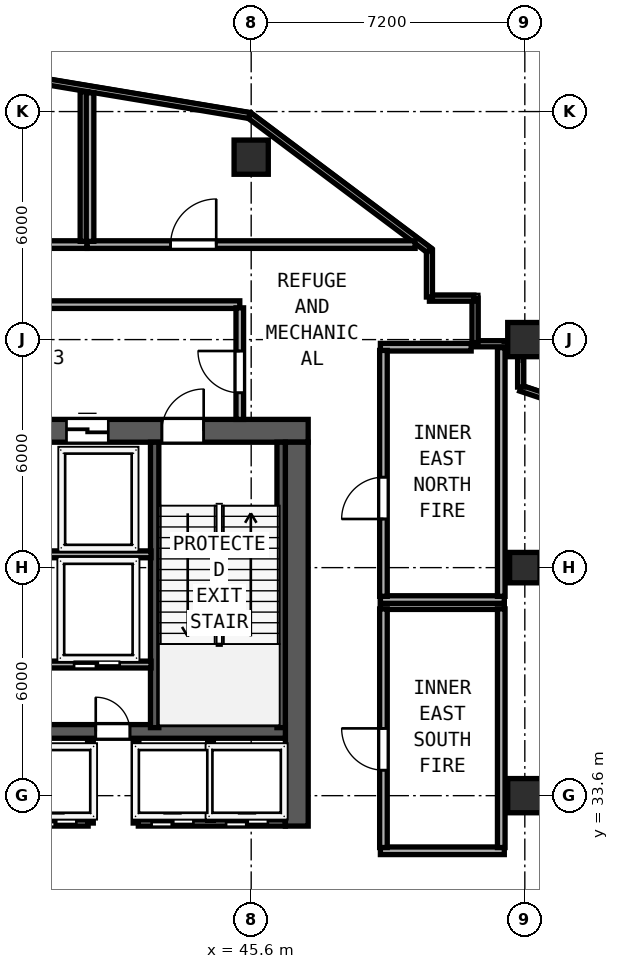
"""IFC4 building model, lengths in metres.
Left out: names, types, materials, properties, quantities, classifications, styles, units other than length and angle.
Written with IfcOpenShell. Run it as: python <this file> out.ifc"""

import sys

from ifc_helpers import new_model, si_unit, direction, frame, frame_2d, origin, origin_2d, place, context, subcontext, project, spatial, rectangle, hollow_rectangle, extrude, element, fill, save


model = new_model("IFC4")
c1 = context("Model", 3, precision=1e-05, world=origin(), true_north=direction((0.0, 1.0)))
c2 = subcontext(c1, "Body", "Model", "MODEL_VIEW")
j1 = project(units=[si_unit("LENGTHUNIT", "METRE"), si_unit("PLANEANGLEUNIT", "RADIAN")], contexts=[c1])
p1 = place(None, origin())
s1 = spatial("IfcSite", under=j1, at=p1, CompositionType="ELEMENT")
p2 = place(p1, origin())
s2 = spatial("IfcBuilding", under=s1, at=p2, CompositionType="ELEMENT")
p3 = place(p2, frame((0.0, 0.0, 207.0)))
s3 = spatial("IfcBuildingStorey", under=s2, at=p3, CompositionType="ELEMENT", Elevation=207.0)
p4 = place(p3, frame((29.7, 43.2, 0.0), z_axis=(0.0, 0.0, 1.0), x_axis=(1.0, 0.0, 0.0)))
e1 = element("IfcWall", 1, at=p4, inside=s3, PredefinedType="SHEAR", context=c2, shape_type="SweptSolid", body=[
    extrude(rectangle(XDim=17.4, YDim=0.6, at=frame_2d((8.7, 0.0))), origin(), (0.0, 0.0, 1.0), 4.42),
])
p5 = place(p4, frame((2.35, 0.0, 0.0)))
e2 = element("IfcOpeningElement", 2, at=p5, cuts=e1, PredefinedType="OPENING", context=c2, shape_type="SweptSolid", body=[
    extrude(rectangle(XDim=1.1, YDim=2.15, at=frame_2d((0.55, 1.075))), frame((0.0, 0.31, 0.0), z_axis=(0.0, -1.0, 0.0), x_axis=(1.0, 0.0, 0.0)), (0.0, 0.0, 1.0), 0.62),
])
p6 = place(p4, frame((7.46, 0.0, 0.0)))
e3 = element("IfcOpeningElement", 3, at=p6, cuts=e1, PredefinedType="OPENING", context=c2, shape_type="SweptSolid", body=[
    extrude(rectangle(XDim=1.1, YDim=2.15, at=frame_2d((0.55, 1.075))), frame((0.0, 0.31, 0.0), z_axis=(0.0, -1.0, 0.0), x_axis=(1.0, 0.0, 0.0)), (0.0, 0.0, 1.0), 0.62),
])
p7 = place(p4, frame((13.55, 0.0, 0.0)))
e4 = element("IfcOpeningElement", 4, at=p7, cuts=e1, PredefinedType="OPENING", context=c2, shape_type="SweptSolid", body=[
    extrude(rectangle(XDim=1.1, YDim=2.15, at=frame_2d((0.55, 1.075))), frame((0.0, 0.31, 0.0), z_axis=(0.0, -1.0, 0.0), x_axis=(1.0, 0.0, 0.0)), (0.0, 0.0, 1.0), 0.62),
])
p8 = place(p4, frame((4.68, 0.0, 0.0)))
e5 = element("IfcOpeningElement", 5, at=p8, cuts=e1, PredefinedType="OPENING", context=c2, shape_type="SweptSolid", body=[
    extrude(rectangle(XDim=1.1, YDim=2.2, at=frame_2d((0.55, 1.1))), frame((0.0, 0.31, 0.0), z_axis=(0.0, -1.0, 0.0), x_axis=(1.0, 0.0, 0.0)), (0.0, 0.0, 1.0), 0.62),
])
p9 = place(p4, frame((11.04, 0.0, 0.0)))
e6 = element("IfcOpeningElement", 6, at=p9, cuts=e1, PredefinedType="OPENING", context=c2, shape_type="SweptSolid", body=[
    extrude(rectangle(XDim=1.1, YDim=2.2, at=frame_2d((0.55, 1.1))), frame((0.0, 0.31, 0.0), z_axis=(0.0, -1.0, 0.0), x_axis=(1.0, 0.0, 0.0)), (0.0, 0.0, 1.0), 0.62),
])
p10 = place(p3, frame((46.8, 32.8, 0.0), z_axis=(0.0, 0.0, 1.0), x_axis=(0.0, 1.0, 0.0)))
e7 = element("IfcWall", 7, at=p10, inside=s3, PredefinedType="SHEAR", context=c2, shape_type="SweptSolid", body=[
    extrude(rectangle(XDim=10.1, YDim=0.6, at=frame_2d((5.05, 0.0))), origin(), (0.0, 0.0, 1.0), 4.42),
])
p11 = place(p3, frame((30.3, 35.29, 0.0), z_axis=(0.0, 0.0, 1.0), x_axis=(1.0, 0.0, 0.0)))
e8 = element("IfcWall", 8, at=p11, inside=s3, PredefinedType="SHEAR", context=c2, shape_type="SweptSolid", body=[
    extrude(rectangle(XDim=16.2, YDim=0.36, at=frame_2d((8.1, 0.0))), origin(), (0.0, 0.0, 1.0), 4.42),
])
p12 = place(p11, frame((5.05, 0.0, 0.0), z_axis=(0.0, 0.0, 1.0), x_axis=(-1.0, 0.0, 0.0)))
e9 = element("IfcOpeningElement", 9, at=p12, cuts=e8, PredefinedType="OPENING", context=c2, shape_type="SweptSolid", body=[
    extrude(rectangle(XDim=0.9, YDim=2.1, at=frame_2d((0.45, 1.05))), frame((0.0, 0.19, 0.0), z_axis=(0.0, -1.0, 0.0), x_axis=(1.0, 0.0, 0.0)), (0.0, 0.0, 1.0), 0.38),
])
p13 = place(p11, frame((12.11, 0.0, 0.0), z_axis=(0.0, 0.0, 1.0), x_axis=(-1.0, 0.0, 0.0)))
e10 = element("IfcOpeningElement", 10, at=p13, cuts=e8, PredefinedType="OPENING", context=c2, shape_type="SweptSolid", body=[
    extrude(rectangle(XDim=0.9, YDim=2.1, at=frame_2d((0.45, 1.05))), frame((0.0, 0.19, 0.0), z_axis=(0.0, -1.0, 0.0), x_axis=(1.0, 0.0, 0.0)), (0.0, 0.0, 1.0), 0.38),
])
for number, where, z_axis, x_axis in (
    (11, (43.06, 35.39, 0.0), (0.0, 0.0, 1.0), (0.0, 1.0, 0.0)),
    (12, (46.388, 35.39, 0.0), (0.0, 0.0, 1.0), (0.0, 1.0, 0.0)),
):
    element("IfcWall", number, at=place(p3, frame(where, z_axis=z_axis, x_axis=x_axis)), inside=s3, PredefinedType="SHEAR", context=c2, shape_type="SweptSolid", body=[
        extrude(rectangle(XDim=7.51, YDim=0.22, at=frame_2d((3.755, 0.0))), origin(), (0.0, 0.0, 1.0), 4.42),
    ])
for number, where, z_axis, x_axis in (
    (13, (52.8, 33.6, 0.0), (0.0, 0.0, 1.0), (1.0, 0.0, 0.0)),
    (14, (52.8, 45.6, 0.0), (0.0, 0.0, 1.0), (1.0, 0.0, 0.0)),
    (15, (45.6, 50.4, 0.0), (0.0, 0.0, 1.0), (1.0, 0.0, 0.0)),
):
    element("IfcColumn", number, at=place(p3, frame(where, z_axis=z_axis, x_axis=x_axis)), inside=s3, PredefinedType="COLUMN", context=c2, shape_type="SweptSolid", body=[
        extrude(hollow_rectangle(XDim=0.9, YDim=0.9, WallThickness=0.034, at=origin_2d()), origin(), (0.0, 0.0, 1.0), 4.6),
    ])
p14 = place(p3, frame((52.8, 39.6, 0.0), z_axis=(0.0, 0.0, 1.0), x_axis=(1.0, 0.0, 0.0)))
e16 = element("IfcColumn", 16, at=p14, inside=s3, PredefinedType="COLUMN", context=c2, shape_type="SweptSolid", body=[
    extrude(hollow_rectangle(XDim=0.8, YDim=0.8, WallThickness=0.03, at=origin_2d()), origin(), (0.0, 0.0, 1.0), 4.6),
])
p15 = place(p3, frame((58.476, 42.392, 0.0), z_axis=(0.0, 0.0, 1.0), x_axis=(-0.948687300706, 0.316215757798, 0.0)))
e17 = element("IfcWall", 17, at=p15, inside=s3, PredefinedType="PARAPET", context=c2, shape_type="SweptSolid", body=[
    extrude(rectangle(XDim=6.099, YDim=0.16, at=frame_2d((3.05, 0.0))), origin(), (0.0, 0.0, 1.0), 1.15),
])
p16 = place(p3, frame((52.69, 44.351, 0.0), z_axis=(0.0, 0.0, 1.0), x_axis=(0.0, 1.0, 0.0)))
e18 = element("IfcWall", 18, at=p16, inside=s3, PredefinedType="PARAPET", context=c2, shape_type="SweptSolid", body=[
    extrude(rectangle(XDim=0.807, YDim=0.16, at=frame_2d((0.404, 0.0))), origin(), (0.0, 0.0, 1.0), 1.15),
])
p17 = place(p3, frame((52.358, 45.49, 0.0), z_axis=(0.0, 0.0, 1.0), x_axis=(-1.0, 0.0, 0.0)))
e19 = element("IfcWall", 19, at=p17, inside=s3, PredefinedType="PARAPET", context=c2, shape_type="SweptSolid", body=[
    extrude(rectangle(XDim=0.868, YDim=0.16, at=frame_2d((0.434, 0.0))), origin(), (0.0, 0.0, 1.0), 1.15),
])
for number, where, z_axis, x_axis in (
    (20, (51.49, 45.52, 0.0), (0.0, 0.0, 1.0), (0.0, 1.0, 0.0)),
    (21, (51.46, 46.69, 0.0), (0.0, 0.0, 1.0), (-1.0, 0.0, 0.0)),
):
    element("IfcWall", number, at=place(p3, frame(where, z_axis=z_axis, x_axis=x_axis)), inside=s3, PredefinedType="PARAPET", context=c2, shape_type="SweptSolid", body=[
        extrude(rectangle(XDim=1.17, YDim=0.16, at=frame_2d((0.585, 0.0))), origin(), (0.0, 0.0, 1.0), 1.15),
    ])
p18 = place(p3, frame((50.29, 46.72, 0.0), z_axis=(0.0, 0.0, 1.0), x_axis=(0.0, 1.0, 0.0)))
e22 = element("IfcWall", 22, at=p18, inside=s3, PredefinedType="PARAPET", context=c2, shape_type="SweptSolid", body=[
    extrude(rectangle(XDim=1.225, YDim=0.16, at=frame_2d((0.613, 0.0))), origin(), (0.0, 0.0, 1.0), 1.15),
])
p19 = place(p3, frame((50.278, 47.954, 0.0), z_axis=(0.0, 0.0, 1.0), x_axis=(-0.800019851171, 0.599973530859, 0.0)))
e23 = element("IfcWall", 23, at=p19, inside=s3, PredefinedType="PARAPET", context=c2, shape_type="SweptSolid", body=[
    extrude(rectangle(XDim=5.903, YDim=0.16, at=frame_2d((2.952, 0.0))), origin(), (0.0, 0.0, 1.0), 1.15),
])
p20 = place(p3, frame((45.555, 51.496, 0.0), z_axis=(0.0, 0.0, 1.0), x_axis=(-0.986393014224, 0.164404444863, 0.0)))
e24 = element("IfcWall", 24, at=p20, inside=s3, PredefinedType="PARAPET", context=c2, shape_type="SweptSolid", body=[
    extrude(rectangle(XDim=7.254, YDim=0.16, at=frame_2d((3.627, 0.0))), origin(), (0.0, 0.0, 1.0), 1.15),
])
p21 = place(p3, frame((31.5, 46.52, 0.0), z_axis=(0.0, 0.0, 1.0), x_axis=(1.0, 0.0, 0.0)))
e25 = element("IfcWall", 25, at=p21, inside=s3, PredefinedType="SOLIDWALL", context=c2, shape_type="SweptSolid", body=[
    extrude(rectangle(XDim=13.8, YDim=0.2, at=frame_2d((6.9, 0.0))), origin(), (0.0, 0.0, 1.0), 4.42),
])
p22 = place(p3, frame((45.3, 43.5, 0.0), z_axis=(0.0, 0.0, 1.0), x_axis=(0.0, 1.0, 0.0)))
e26 = element("IfcWall", 26, at=p22, inside=s3, PredefinedType="SOLIDWALL", context=c2, shape_type="SweptSolid", body=[
    extrude(rectangle(XDim=2.935, YDim=0.2, at=frame_2d((1.468, 0.0))), origin(), (0.0, 0.0, 1.0), 4.42),
])
p23 = place(p22, frame((0.7, 0.0, 0.0)))
e27 = element("IfcOpeningElement", 27, at=p23, cuts=e26, PredefinedType="OPENING", context=c2, shape_type="SweptSolid", body=[
    extrude(rectangle(XDim=1.1, YDim=2.15, at=frame_2d((0.55, 1.075))), frame((0.0, 0.11, 0.0), z_axis=(0.0, -1.0, 0.0), x_axis=(1.0, 0.0, 0.0)), (0.0, 0.0, 1.0), 0.22),
])
p24 = place(p3, frame((40.195, 39.95, 0.0), z_axis=(0.0, 0.0, 1.0), x_axis=(1.0, 0.0, 0.0)))
e28 = element("IfcWall", 28, at=p24, inside=s3, PredefinedType="SOLIDWALL", context=c2, shape_type="SweptSolid", body=[
    extrude(rectangle(XDim=2.77, YDim=0.18, at=frame_2d((1.385, 0.0))), origin(), (0.0, 0.0, 1.0), 4.42),
])
p25 = place(p3, frame((40.195, 37.05, 0.0), z_axis=(0.0, 0.0, 1.0), x_axis=(1.0, 0.0, 0.0)))
e29 = element("IfcWall", 29, at=p25, inside=s3, PredefinedType="SOLIDWALL", context=c2, shape_type="SweptSolid", body=[
    extrude(rectangle(XDim=2.77, YDim=0.18, at=frame_2d((1.385, 0.0))), origin(), (0.0, 0.0, 1.0), 4.42),
])
p26 = place(p25, frame((1.945, 0.0, 0.0), z_axis=(0.0, 0.0, 1.0), x_axis=(-1.0, 0.0, 0.0)))
e30 = element("IfcOpeningElement", 30, at=p26, cuts=e29, PredefinedType="OPENING", context=c2, shape_type="SweptSolid", body=[
    extrude(rectangle(XDim=1.2, YDim=2.2, at=frame_2d((0.6, 1.1))), frame((0.0, 0.1, 0.0), z_axis=(0.0, -1.0, 0.0), x_axis=(1.0, 0.0, 0.0)), (0.0, 0.0, 1.0), 0.2),
])
for number, where, z_axis, x_axis in (
    (31, (41.37, 32.88, 0.0), (0.0, 0.0, 1.0), (0.0, 1.0, 0.0)),
    (32, (42.57, 32.88, 0.0), (0.0, 0.0, 1.0), (0.0, 1.0, 0.0)),
):
    element("IfcWall", number, at=place(p3, frame(where, z_axis=z_axis, x_axis=x_axis)), inside=s3, PredefinedType="SOLIDWALL", context=c2, shape_type="SweptSolid", body=[
        extrude(rectangle(XDim=2.17, YDim=0.15, at=frame_2d((1.085, 0.0))), origin(), (0.0, 0.0, 1.0), 4.42),
    ])
p27 = place(p3, frame((35.57, 32.88, 0.0), z_axis=(0.0, 0.0, 1.0), x_axis=(1.0, 0.0, 0.0)))
e33 = element("IfcWall", 33, at=p27, inside=s3, PredefinedType="SOLIDWALL", context=c2, shape_type="SweptSolid", body=[
    extrude(rectangle(XDim=5.74, YDim=0.16, at=frame_2d((2.87, 0.0))), origin(), (0.0, 0.0, 1.0), 4.42),
])
p28 = place(p27, frame((1.49, 0.0, 0.0), z_axis=(0.0, 0.0, 1.0), x_axis=(-1.0, 0.0, 0.0)))
e34 = element("IfcOpeningElement", 34, at=p28, cuts=e33, PredefinedType="OPENING", context=c2, shape_type="SweptSolid", body=[
    extrude(rectangle(XDim=0.95, YDim=2.12, at=frame_2d((0.475, 1.06))), frame((0.0, 0.09, 0.0), z_axis=(0.0, -1.0, 0.0), x_axis=(1.0, 0.0, 0.0)), (0.0, 0.0, 1.0), 0.18),
])
p29 = place(p27, frame((5.43, 0.0, 0.0), z_axis=(0.0, 0.0, 1.0), x_axis=(-1.0, 0.0, 0.0)))
e35 = element("IfcOpeningElement", 35, at=p29, cuts=e33, PredefinedType="OPENING", context=c2, shape_type="SweptSolid", body=[
    extrude(rectangle(XDim=1.1, YDim=2.2, at=frame_2d((0.55, 1.1))), frame((0.0, 0.09, 0.0), z_axis=(0.0, -1.0, 0.0), x_axis=(1.0, 0.0, 0.0)), (0.0, 0.0, 1.0), 0.18),
])
p30 = place(p3, frame((42.63, 32.88, 0.0), z_axis=(0.0, 0.0, 1.0), x_axis=(1.0, 0.0, 0.0)))
e36 = element("IfcWall", 36, at=p30, inside=s3, PredefinedType="SOLIDWALL", context=c2, shape_type="SweptSolid", body=[
    extrude(rectangle(XDim=3.87, YDim=0.16, at=frame_2d((1.935, 0.0))), origin(), (0.0, 0.0, 1.0), 4.42),
])
p31 = place(p30, frame((1.45, 0.0, 0.0), z_axis=(0.0, 0.0, 1.0), x_axis=(-1.0, 0.0, 0.0)))
e37 = element("IfcOpeningElement", 37, at=p31, cuts=e36, PredefinedType="OPENING", context=c2, shape_type="SweptSolid", body=[
    extrude(rectangle(XDim=1.1, YDim=2.2, at=frame_2d((0.55, 1.1))), frame((0.0, 0.09, 0.0), z_axis=(0.0, -1.0, 0.0), x_axis=(1.0, 0.0, 0.0)), (0.0, 0.0, 1.0), 0.18),
])
p32 = place(p30, frame((3.41, 0.0, 0.0), z_axis=(0.0, 0.0, 1.0), x_axis=(-1.0, 0.0, 0.0)))
e38 = element("IfcOpeningElement", 38, at=p32, cuts=e36, PredefinedType="OPENING", context=c2, shape_type="SweptSolid", body=[
    extrude(rectangle(XDim=1.1, YDim=2.2, at=frame_2d((0.55, 1.1))), frame((0.0, 0.09, 0.0), z_axis=(0.0, -1.0, 0.0), x_axis=(1.0, 0.0, 0.0)), (0.0, 0.0, 1.0), 0.18),
])
p33 = place(p3, frame((44.53, 32.95, 0.0), z_axis=(0.0, 0.0, 1.0), x_axis=(0.0, 1.0, 0.0)))
e39 = element("IfcWall", 39, at=p33, inside=s3, PredefinedType="SOLIDWALL", context=c2, shape_type="SweptSolid", body=[
    extrude(rectangle(XDim=2.05, YDim=0.15, at=frame_2d((1.025, 0.0))), origin(), (0.0, 0.0, 1.0), 4.42),
])
for number, where, z_axis, x_axis in (
    (40, (49.0, 38.6, 0.0), (0.0, 0.0, 1.0), (1.0, 0.0, 0.0)),
    (41, (49.0, 32.15, 0.0), (0.0, 0.0, 1.0), (1.0, 0.0, 0.0)),
):
    element("IfcWall", number, at=place(p3, frame(where, z_axis=z_axis, x_axis=x_axis)), inside=s3, PredefinedType="SOLIDWALL", context=c2, shape_type="SweptSolid", body=[
        extrude(rectangle(XDim=3.26, YDim=0.2, at=frame_2d((1.63, 0.0))), origin(), (0.0, 0.0, 1.0), 4.42),
    ])
p34 = place(p3, frame((49.08, 32.235, 0.0), z_axis=(0.0, 0.0, 1.0), x_axis=(0.0, 1.0, 0.0)))
e42 = element("IfcWall", 42, at=p34, inside=s3, PredefinedType="SOLIDWALL", context=c2, shape_type="SweptSolid", body=[
    extrude(rectangle(XDim=6.28, YDim=0.2, at=frame_2d((3.14, 0.0))), origin(), (0.0, 0.0, 1.0), 4.42),
])
p35 = place(p34, frame((2.035, 0.0, 0.0)))
e43 = element("IfcOpeningElement", 43, at=p35, cuts=e42, PredefinedType="OPENING", context=c2, shape_type="SweptSolid", body=[
    extrude(rectangle(XDim=1.1, YDim=2.15, at=frame_2d((0.55, 1.075))), frame((0.0, 0.11, 0.0), z_axis=(0.0, -1.0, 0.0), x_axis=(1.0, 0.0, 0.0)), (0.0, 0.0, 1.0), 0.22),
])
p36 = place(p3, frame((52.18, 32.235, 0.0), z_axis=(0.0, 0.0, 1.0), x_axis=(0.0, 1.0, 0.0)))
e44 = element("IfcWall", 44, at=p36, inside=s3, PredefinedType="SOLIDWALL", context=c2, shape_type="SweptSolid", body=[
    extrude(rectangle(XDim=6.28, YDim=0.2, at=frame_2d((3.14, 0.0))), origin(), (0.0, 0.0, 1.0), 4.42),
])
p37 = place(p3, frame((49.0, 45.4, 0.0), z_axis=(0.0, 0.0, 1.0), x_axis=(1.0, 0.0, 0.0)))
e45 = element("IfcWall", 45, at=p37, inside=s3, PredefinedType="SOLIDWALL", context=c2, shape_type="SweptSolid", body=[
    extrude(rectangle(XDim=2.388, YDim=0.2, at=frame_2d((1.194, 0.0))), origin(), (0.0, 0.0, 1.0), 4.42),
])
p38 = place(p3, frame((49.0, 38.76, 0.0), z_axis=(0.0, 0.0, 1.0), x_axis=(1.0, 0.0, 0.0)))
e46 = element("IfcWall", 46, at=p38, inside=s3, PredefinedType="SOLIDWALL", context=c2, shape_type="SweptSolid", body=[
    extrude(rectangle(XDim=3.26, YDim=0.2, at=frame_2d((1.63, 0.0))), origin(), (0.0, 0.0, 1.0), 4.42),
])
p39 = place(p3, frame((49.08, 38.845, 0.0), z_axis=(0.0, 0.0, 1.0), x_axis=(0.0, 1.0, 0.0)))
e47 = element("IfcWall", 47, at=p39, inside=s3, PredefinedType="SOLIDWALL", context=c2, shape_type="SweptSolid", body=[
    extrude(rectangle(XDim=6.47, YDim=0.2, at=frame_2d((3.235, 0.0))), origin(), (0.0, 0.0, 1.0), 4.42),
])
p40 = place(p39, frame((2.035, 0.0, 0.0)))
e48 = element("IfcOpeningElement", 48, at=p40, cuts=e47, PredefinedType="OPENING", context=c2, shape_type="SweptSolid", body=[
    extrude(rectangle(XDim=1.1, YDim=2.15, at=frame_2d((0.55, 1.075))), frame((0.0, 0.11, 0.0), z_axis=(0.0, -1.0, 0.0), x_axis=(1.0, 0.0, 0.0)), (0.0, 0.0, 1.0), 0.22),
])
p41 = place(p3, frame((52.18, 38.845, 0.0), z_axis=(0.0, 0.0, 1.0), x_axis=(0.0, 1.0, 0.0)))
e49 = element("IfcWall", 49, at=p41, inside=s3, PredefinedType="SOLIDWALL", context=c2, shape_type="SweptSolid", body=[
    extrude(rectangle(XDim=6.543, YDim=0.2, at=frame_2d((3.271, 0.0))), origin(), (0.0, 0.0, 1.0), 4.42),
])
p42 = place(p3, frame((26.887, 48.1, 0.0), z_axis=(0.0, 0.0, 1.0), x_axis=(1.0, 0.0, 0.0)))
e50 = element("IfcWall", 50, at=p42, inside=s3, PredefinedType="SOLIDWALL", context=c2, shape_type="SweptSolid", body=[
    extrude(rectangle(XDim=14.393, YDim=0.2, at=frame_2d((7.197, 0.0))), origin(), (0.0, 0.0, 1.0), 4.42),
])
p43 = place(p42, frame((4.063, 0.0, 0.0)))
e51 = element("IfcOpeningElement", 51, at=p43, cuts=e50, PredefinedType="OPENING", context=c2, shape_type="SweptSolid", body=[
    extrude(rectangle(XDim=1.2, YDim=2.15, at=frame_2d((0.6, 1.075))), frame((0.0, 0.11, 0.0), z_axis=(0.0, -1.0, 0.0), x_axis=(1.0, 0.0, 0.0)), (0.0, 0.0, 1.0), 0.22),
])
p44 = place(p3, frame((41.2, 48.185, 0.0), z_axis=(0.0, 0.0, 1.0), x_axis=(0.0, 1.0, 0.0)))
e52 = element("IfcWall", 52, at=p44, inside=s3, PredefinedType="SOLIDWALL", context=c2, shape_type="SweptSolid", body=[
    extrude(rectangle(XDim=3.933, YDim=0.2, at=frame_2d((1.967, 0.0))), origin(), (0.0, 0.0, 1.0), 4.42),
])
p45 = place(p3, frame((41.285, 48.1, 0.0), z_axis=(0.0, 0.0, 1.0), x_axis=(1.0, 0.0, 0.0)))
e53 = element("IfcWall", 53, at=p45, inside=s3, PredefinedType="SOLIDWALL", context=c2, shape_type="SweptSolid", body=[
    extrude(rectangle(XDim=8.628, YDim=0.2, at=frame_2d((4.314, 0.0))), origin(), (0.0, 0.0, 1.0), 4.42),
])
p46 = place(p45, frame((2.195, 0.0, 0.0)))
e54 = element("IfcOpeningElement", 54, at=p46, cuts=e53, PredefinedType="OPENING", context=c2, shape_type="SweptSolid", body=[
    extrude(rectangle(XDim=1.2, YDim=2.15, at=frame_2d((0.6, 1.075))), frame((0.0, 0.11, 0.0), z_axis=(0.0, -1.0, 0.0), x_axis=(1.0, 0.0, 0.0)), (0.0, 0.0, 1.0), 0.22),
])
p47 = place(p3, frame((41.36, 48.185, 0.0), z_axis=(0.0, 0.0, 1.0), x_axis=(0.0, 1.0, 0.0)))
e55 = element("IfcWall", 55, at=p47, inside=s3, PredefinedType="SOLIDWALL", context=c2, shape_type="SweptSolid", body=[
    extrude(rectangle(XDim=3.907, YDim=0.2, at=frame_2d((1.953, 0.0))), origin(), (0.0, 0.0, 1.0), 4.42),
])
p48 = place(p7, origin())
e56 = element("IfcDoor", 56, at=p48, inside=s3, OperationType="SINGLE_SWING_RIGHT", PredefinedType="DOOR", context=c2, shape_type="SweptSolid", body=[
    extrude(rectangle(XDim=1.1, YDim=2.15, at=frame_2d((0.55, 1.075))), frame((0.0, 0.185, 0.0), z_axis=(0.0, -1.0, 0.0), x_axis=(1.0, 0.0, 0.0)), (0.0, 0.0, 1.0), 0.05),
])
fill(e4, e56)
p49 = place(p23, origin())
e57 = element("IfcDoor", 57, at=p49, inside=s3, OperationType="SINGLE_SWING_RIGHT", PredefinedType="DOOR", context=c2, shape_type="SweptSolid", body=[
    extrude(rectangle(XDim=1.1, YDim=2.15, at=frame_2d((0.55, 1.075))), frame((0.0, 0.025, 0.0), z_axis=(0.0, -1.0, 0.0), x_axis=(1.0, 0.0, 0.0)), (0.0, 0.0, 1.0), 0.05),
])
fill(e27, e57)
p50 = place(p9, origin())
e58 = element("IfcDoor", 58, at=p50, inside=s3, OperationType="SLIDING_TO_LEFT", PredefinedType="DOOR", context=c2, shape_type="SweptSolid", body=[
    extrude(rectangle(XDim=1.1, YDim=2.2, at=frame_2d((0.55, 1.1))), frame((0.0, 0.185, 0.0), z_axis=(0.0, -1.0, 0.0), x_axis=(1.0, 0.0, 0.0)), (0.0, 0.0, 1.0), 0.05),
])
fill(e6, e58)
p51 = place(p26, origin())
e59 = element("IfcDoor", 59, at=p51, inside=s3, OperationType="SLIDING_TO_RIGHT", PredefinedType="DOOR", context=c2, shape_type="SweptSolid", body=[
    extrude(rectangle(XDim=1.2, YDim=2.2, at=frame_2d((0.6, 1.1))), frame((0.0, 0.025, 0.0), z_axis=(0.0, -1.0, 0.0), x_axis=(1.0, 0.0, 0.0)), (0.0, 0.0, 1.0), 0.05),
])
fill(e30, e59)
p52 = place(p13, origin())
e60 = element("IfcDoor", 60, at=p52, inside=s3, OperationType="SINGLE_SWING_RIGHT", PredefinedType="DOOR", context=c2, shape_type="SweptSolid", body=[
    extrude(rectangle(XDim=0.9, YDim=2.1, at=frame_2d((0.45, 1.05))), frame((0.0, 0.025, 0.0), z_axis=(0.0, -1.0, 0.0), x_axis=(1.0, 0.0, 0.0)), (0.0, 0.0, 1.0), 0.05),
])
fill(e10, e60)
p53 = place(p29, origin())
e61 = element("IfcDoor", 61, at=p53, inside=s3, OperationType="SLIDING_TO_RIGHT", PredefinedType="DOOR", context=c2, shape_type="SweptSolid", body=[
    extrude(rectangle(XDim=1.1, YDim=2.2, at=frame_2d((0.55, 1.1))), frame((0.0, 0.025, 0.0), z_axis=(0.0, -1.0, 0.0), x_axis=(1.0, 0.0, 0.0)), (0.0, 0.0, 1.0), 0.05),
])
fill(e35, e61)
p54 = place(p31, origin())
e62 = element("IfcDoor", 62, at=p54, inside=s3, OperationType="SLIDING_TO_RIGHT", PredefinedType="DOOR", context=c2, shape_type="SweptSolid", body=[
    extrude(rectangle(XDim=1.1, YDim=2.2, at=frame_2d((0.55, 1.1))), frame((0.0, 0.025, 0.0), z_axis=(0.0, -1.0, 0.0), x_axis=(1.0, 0.0, 0.0)), (0.0, 0.0, 1.0), 0.05),
])
fill(e37, e62)
p55 = place(p32, origin())
e63 = element("IfcDoor", 63, at=p55, inside=s3, OperationType="SLIDING_TO_RIGHT", PredefinedType="DOOR", context=c2, shape_type="SweptSolid", body=[
    extrude(rectangle(XDim=1.1, YDim=2.2, at=frame_2d((0.55, 1.1))), frame((0.0, 0.025, 0.0), z_axis=(0.0, -1.0, 0.0), x_axis=(1.0, 0.0, 0.0)), (0.0, 0.0, 1.0), 0.05),
])
fill(e38, e63)
p56 = place(p35, origin())
e64 = element("IfcDoor", 64, at=p56, inside=s3, OperationType="SINGLE_SWING_RIGHT", PredefinedType="DOOR", context=c2, shape_type="SweptSolid", body=[
    extrude(rectangle(XDim=1.1, YDim=2.15, at=frame_2d((0.55, 1.075))), frame((0.0, 0.025, 0.0), z_axis=(0.0, -1.0, 0.0), x_axis=(1.0, 0.0, 0.0)), (0.0, 0.0, 1.0), 0.05),
])
fill(e43, e64)
p57 = place(p40, origin())
e65 = element("IfcDoor", 65, at=p57, inside=s3, OperationType="SINGLE_SWING_LEFT", PredefinedType="DOOR", context=c2, shape_type="SweptSolid", body=[
    extrude(rectangle(XDim=1.1, YDim=2.15, at=frame_2d((0.55, 1.075))), frame((0.0, 0.025, 0.0), z_axis=(0.0, -1.0, 0.0), x_axis=(1.0, 0.0, 0.0)), (0.0, 0.0, 1.0), 0.05),
])
fill(e48, e65)
p58 = place(p46, origin())
e66 = element("IfcDoor", 66, at=p58, inside=s3, OperationType="SINGLE_SWING_RIGHT", PredefinedType="DOOR", context=c2, shape_type="SweptSolid", body=[
    extrude(rectangle(XDim=1.2, YDim=2.15, at=frame_2d((0.6, 1.075))), frame((0.0, 0.025, 0.0), z_axis=(0.0, -1.0, 0.0), x_axis=(1.0, 0.0, 0.0)), (0.0, 0.0, 1.0), 0.05),
])
fill(e54, e66)
save(model, sys.argv[1])
